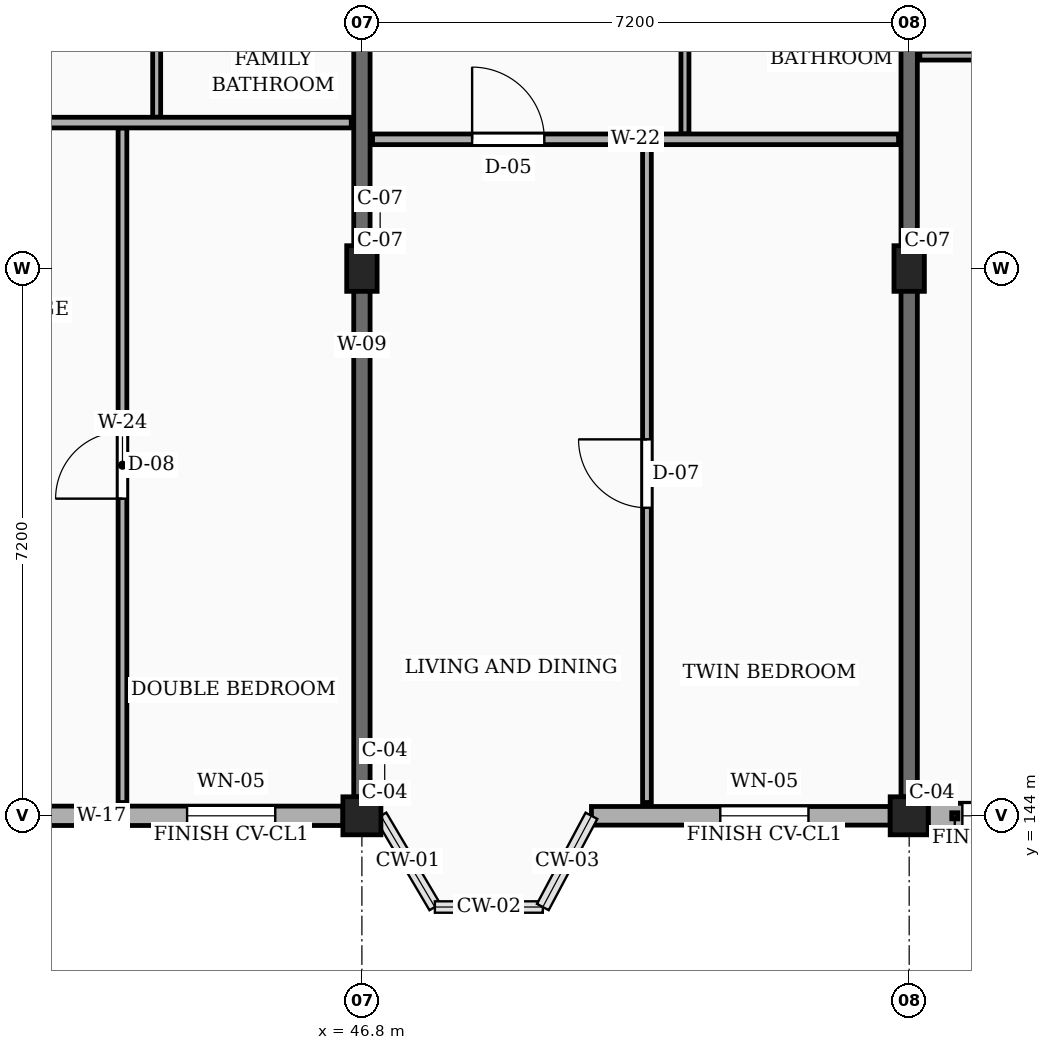
"""IFC4 building model, lengths in metres.
Left out: names, types, materials, properties, quantities, classifications, styles, units other than length and angle.
Written with IfcOpenShell. Run it as: python <this file> out.ifc"""

import sys

from ifc_helpers import new_model, si_unit, direction, frame, frame_2d, origin, origin_2d, place, context, subcontext, project, spatial, rectangle, extrude, element, fill, save


model = new_model("IFC4")
c1 = context("Model", 3, precision=1e-05, world=origin(), true_north=direction((0.0, 1.0)))
c2 = subcontext(c1, "Body", "Model", "MODEL_VIEW")
j1 = project(units=[si_unit("LENGTHUNIT", "METRE"), si_unit("PLANEANGLEUNIT", "RADIAN")], contexts=[c1])
p1 = place(None, origin())
s1 = spatial("IfcSite", under=j1, at=p1, CompositionType="ELEMENT")
p2 = place(p1, origin())
s2 = spatial("IfcBuilding", under=s1, at=p2, CompositionType="ELEMENT")
p3 = place(p2, frame((0.0, 0.0, 26.55)))
s3 = spatial("IfcBuildingStorey", under=s2, at=p3, CompositionType="ELEMENT", Elevation=26.55)
p4 = place(p3, frame((46.8, 144.0, 0.0), z_axis=(0.0, 0.0, 1.0), x_axis=(1.0, 0.0, 0.0)))
e1 = element("IfcColumn", 1, at=p4, inside=s3, PredefinedType="COLUMN", context=c2, shape_type="SweptSolid", body=[
    extrude(rectangle(XDim=0.5, YDim=0.5, at=origin_2d()), origin(), (0.0, 0.0, 1.0), 3.15),
])
p5 = place(p3, frame((46.8, 151.2, 0.0), z_axis=(0.0, 0.0, 1.0), x_axis=(1.0, 0.0, 0.0)))
e2 = element("IfcColumn", 2, at=p5, inside=s3, PredefinedType="COLUMN", context=c2, shape_type="SweptSolid", body=[
    extrude(rectangle(XDim=0.4, YDim=0.6, at=origin_2d()), origin(), (0.0, 0.0, 1.0), 3.15),
])
p6 = place(p3, frame((54.0, 144.0, 0.0), z_axis=(0.0, 0.0, 1.0), x_axis=(1.0, 0.0, 0.0)))
e3 = element("IfcColumn", 3, at=p6, inside=s3, PredefinedType="COLUMN", context=c2, shape_type="SweptSolid", body=[
    extrude(rectangle(XDim=0.5, YDim=0.5, at=origin_2d()), origin(), (0.0, 0.0, 1.0), 3.15),
])
p7 = place(p3, frame((54.0, 151.2, 0.0), z_axis=(0.0, 0.0, 1.0), x_axis=(1.0, 0.0, 0.0)))
e4 = element("IfcColumn", 4, at=p7, inside=s3, PredefinedType="COLUMN", context=c2, shape_type="SweptSolid", body=[
    extrude(rectangle(XDim=0.4, YDim=0.6, at=origin_2d()), origin(), (0.0, 0.0, 1.0), 3.15),
])
for number, where, z_axis, x_axis in (
    (5, (46.8, 144.25, 0.0), (0.0, 0.0, 1.0), (0.0, 1.0, 0.0)),
    (6, (54.0, 144.25, 0.0), (0.0, 0.0, 1.0), (0.0, 1.0, 0.0)),
):
    element("IfcWall", number, at=place(p3, frame(where, z_axis=z_axis, x_axis=x_axis)), inside=s3, PredefinedType="SOLIDWALL", context=c2, shape_type="SweptSolid", body=[
        extrude(rectangle(XDim=11.9, YDim=0.215, at=frame_2d((5.95, 0.0))), origin(), (0.0, 0.0, 1.0), 2.185),
    ])
p8 = place(p3, frame((39.85, 144.0, 0.0), z_axis=(0.0, 0.0, 1.0), x_axis=(1.0, 0.0, 0.0)))
e7 = element("IfcWall", 7, at=p8, inside=s3, PredefinedType="SOLIDWALL", context=c2, shape_type="SweptSolid", body=[
    extrude(rectangle(XDim=6.7, YDim=0.255, at=frame_2d((3.35, 0.0))), origin(), (0.0, 0.0, 1.0), 2.455),
])
p9 = place(p8, frame((0.45, 0.0, 0.78)))
e8 = element("IfcOpeningElement", 8, at=p9, cuts=e7, PredefinedType="OPENING", context=c2, shape_type="SweptSolid", body=[
    extrude(rectangle(XDim=1.0, YDim=1.15, at=frame_2d((0.5, 0.575))), frame((0.0, 0.137, 0.0), z_axis=(0.0, -1.0, 0.0), x_axis=(1.0, 0.0, 0.0)), (0.0, 0.0, 1.0), 0.275),
])
p10 = place(p8, frame((4.65, 0.0, 0.78)))
e9 = element("IfcOpeningElement", 9, at=p10, cuts=e7, PredefinedType="OPENING", context=c2, shape_type="SweptSolid", body=[
    extrude(rectangle(XDim=1.16, YDim=1.15, at=frame_2d((0.58, 0.575))), frame((0.0, 0.137, 0.0), z_axis=(0.0, -1.0, 0.0), x_axis=(1.0, 0.0, 0.0)), (0.0, 0.0, 1.0), 0.275),
])
p11 = place(p3, frame((49.82, 144.0, 0.0), z_axis=(0.0, 0.0, 1.0), x_axis=(1.0, 0.0, 0.0)))
e10 = element("IfcWall", 10, at=p11, inside=s3, PredefinedType="SOLIDWALL", context=c2, shape_type="SweptSolid", body=[
    extrude(rectangle(XDim=3.93, YDim=0.245, at=frame_2d((1.965, 0.0))), origin(), (0.0, 0.0, 1.0), 2.455),
])
p12 = place(p11, frame((1.695, 0.0, 0.78)))
e11 = element("IfcOpeningElement", 11, at=p12, cuts=e10, PredefinedType="OPENING", context=c2, shape_type="SweptSolid", body=[
    extrude(rectangle(XDim=1.16, YDim=1.15, at=frame_2d((0.58, 0.575))), frame((0.0, 0.133, 0.0), z_axis=(0.0, -1.0, 0.0), x_axis=(1.0, 0.0, 0.0)), (0.0, 0.0, 1.0), 0.265),
])
p13 = place(p3, frame((54.25, 144.0, 0.0), z_axis=(0.0, 0.0, 1.0), x_axis=(1.0, 0.0, 0.0)))
e12 = element("IfcWall", 12, at=p13, inside=s3, PredefinedType="SOLIDWALL", context=c2, shape_type="SweptSolid", body=[
    extrude(rectangle(XDim=6.7, YDim=0.33, at=frame_2d((3.35, 0.0))), origin(), (0.0, 0.0, 1.0), 2.455),
])
p14 = place(p13, frame((0.45, 0.0, 0.78)))
e13 = element("IfcOpeningElement", 13, at=p14, cuts=e12, PredefinedType="OPENING", context=c2, shape_type="SweptSolid", body=[
    extrude(rectangle(XDim=1.24, YDim=1.15, at=frame_2d((0.62, 0.575))), frame((0.0, 0.175, 0.0), z_axis=(0.0, -1.0, 0.0), x_axis=(1.0, 0.0, 0.0)), (0.0, 0.0, 1.0), 0.35),
])
p15 = place(p13, frame((4.65, 0.0, 0.78)))
e14 = element("IfcOpeningElement", 14, at=p15, cuts=e12, PredefinedType="OPENING", context=c2, shape_type="SweptSolid", body=[
    extrude(rectangle(XDim=1.4, YDim=1.15, at=frame_2d((0.7, 0.575))), frame((0.0, 0.175, 0.0), z_axis=(0.0, -1.0, 0.0), x_axis=(1.0, 0.0, 0.0)), (0.0, 0.0, 1.0), 0.35),
])
p16 = place(p3, frame((43.65, 144.175, 0.0), z_axis=(0.0, 0.0, 1.0), x_axis=(0.0, 1.0, 0.0)))
e15 = element("IfcWall", 15, at=p16, inside=s3, PredefinedType="PARTITIONING", context=c2, shape_type="SweptSolid", body=[
    extrude(rectangle(XDim=8.875, YDim=0.115, at=frame_2d((4.438, 0.0))), origin(), (0.0, 0.0, 1.0), 2.32),
])
p17 = place(p16, frame((3.998, 0.0, 0.0)))
e16 = element("IfcOpeningElement", 16, at=p17, cuts=e15, PredefinedType="OPENING", context=c2, shape_type="SweptSolid", body=[
    extrude(rectangle(XDim=0.88, YDim=2.08, at=frame_2d((0.44, 1.04))), frame((0.0, 0.067, 0.0), z_axis=(0.0, -1.0, 0.0), x_axis=(1.0, 0.0, 0.0)), (0.0, 0.0, 1.0), 0.135),
])
p18 = place(p3, frame((44.1, 153.19, 0.0), z_axis=(0.0, 0.0, 1.0), x_axis=(0.0, 1.0, 0.0)))
e17 = element("IfcWall", 17, at=p18, inside=s3, PredefinedType="PARTITIONING", context=c2, shape_type="SweptSolid", body=[
    extrude(rectangle(XDim=3.02, YDim=0.105, at=frame_2d((1.51, 0.0))), origin(), (0.0, 0.0, 1.0), 2.32),
])
p19 = place(p18, frame((1.075, 0.0, 0.0)))
e18 = element("IfcOpeningElement", 18, at=p19, cuts=e17, PredefinedType="OPENING", context=c2, shape_type="SweptSolid", body=[
    extrude(rectangle(XDim=0.87, YDim=2.05, at=frame_2d((0.435, 1.025))), frame((0.0, 0.062, 0.0), z_axis=(0.0, -1.0, 0.0), x_axis=(1.0, 0.0, 0.0)), (0.0, 0.0, 1.0), 0.125),
])
p20 = place(p3, frame((39.74, 153.12, 0.0), z_axis=(0.0, 0.0, 1.0), x_axis=(1.0, 0.0, 0.0)))
e19 = element("IfcWall", 19, at=p20, inside=s3, PredefinedType="PARTITIONING", context=c2, shape_type="SweptSolid", body=[
    extrude(rectangle(XDim=6.92, YDim=0.14, at=frame_2d((3.46, 0.0))), origin(), (0.0, 0.0, 1.0), 2.32),
])
p21 = place(p20, frame((1.31, 0.0, 0.0)))
e20 = element("IfcOpeningElement", 20, at=p21, cuts=e19, PredefinedType="OPENING", context=c2, shape_type="SweptSolid", body=[
    extrude(rectangle(XDim=0.92, YDim=2.1, at=frame_2d((0.46, 1.05))), frame((0.0, 0.08, 0.0), z_axis=(0.0, -1.0, 0.0), x_axis=(1.0, 0.0, 0.0)), (0.0, 0.0, 1.0), 0.16),
])
p22 = place(p3, frame((50.55, 144.175, 0.0), z_axis=(0.0, 0.0, 1.0), x_axis=(0.0, 1.0, 0.0)))
e21 = element("IfcWall", 21, at=p22, inside=s3, PredefinedType="PARTITIONING", context=c2, shape_type="SweptSolid", body=[
    extrude(rectangle(XDim=8.655, YDim=0.115, at=frame_2d((4.328, 0.0))), origin(), (0.0, 0.0, 1.0), 2.32),
])
p23 = place(p22, frame((3.877, 0.0, 0.0)))
e22 = element("IfcOpeningElement", 22, at=p23, cuts=e21, PredefinedType="OPENING", context=c2, shape_type="SweptSolid", body=[
    extrude(rectangle(XDim=0.9, YDim=2.1, at=frame_2d((0.45, 1.05))), frame((0.0, 0.067, 0.0), z_axis=(0.0, -1.0, 0.0), x_axis=(1.0, 0.0, 0.0)), (0.0, 0.0, 1.0), 0.135),
])
p24 = place(p3, frame((51.05, 152.97, 0.0), z_axis=(0.0, 0.0, 1.0), x_axis=(0.0, 1.0, 0.0)))
e23 = element("IfcWall", 23, at=p24, inside=s3, PredefinedType="PARTITIONING", context=c2, shape_type="SweptSolid", body=[
    extrude(rectangle(XDim=3.24, YDim=0.105, at=frame_2d((1.62, 0.0))), origin(), (0.0, 0.0, 1.0), 2.32),
])
p25 = place(p24, frame((1.17, 0.0, 0.0)))
e24 = element("IfcOpeningElement", 24, at=p25, cuts=e23, PredefinedType="OPENING", context=c2, shape_type="SweptSolid", body=[
    extrude(rectangle(XDim=0.9, YDim=2.05, at=frame_2d((0.45, 1.025))), frame((0.0, 0.062, 0.0), z_axis=(0.0, -1.0, 0.0), x_axis=(1.0, 0.0, 0.0)), (0.0, 0.0, 1.0), 0.125),
])
p26 = place(p3, frame((46.94, 152.9, 0.0), z_axis=(0.0, 0.0, 1.0), x_axis=(1.0, 0.0, 0.0)))
e25 = element("IfcWall", 25, at=p26, inside=s3, PredefinedType="PARTITIONING", context=c2, shape_type="SweptSolid", body=[
    extrude(rectangle(XDim=6.92, YDim=0.14, at=frame_2d((3.46, 0.0))), origin(), (0.0, 0.0, 1.0), 2.32),
])
p27 = place(p26, frame((1.31, 0.0, 0.0)))
e26 = element("IfcOpeningElement", 26, at=p27, cuts=e25, PredefinedType="OPENING", context=c2, shape_type="SweptSolid", body=[
    extrude(rectangle(XDim=0.95, YDim=2.1, at=frame_2d((0.475, 1.05))), frame((0.0, 0.08, 0.0), z_axis=(0.0, -1.0, 0.0), x_axis=(1.0, 0.0, 0.0)), (0.0, 0.0, 1.0), 0.16),
])
p28 = place(p3, frame((54.14, 154.0, 0.0), z_axis=(0.0, 0.0, 1.0), x_axis=(1.0, 0.0, 0.0)))
e27 = element("IfcWall", 27, at=p28, inside=s3, PredefinedType="PARTITIONING", context=c2, shape_type="SweptSolid", body=[
    extrude(rectangle(XDim=2.41, YDim=0.115, at=frame_2d((1.205, 0.0))), origin(), (0.0, 0.0, 1.0), 2.32),
])
p29 = place(p10, origin())
e28 = element("IfcWindow", 28, at=p29, inside=s3, PartitioningType="SINGLE_PANEL", PredefinedType="WINDOW", context=c2, shape_type="SweptSolid", body=[
    extrude(rectangle(XDim=1.16, YDim=1.15, at=frame_2d((0.58, 0.575))), frame((0.0, 0.03, 0.0), z_axis=(0.0, -1.0, 0.0), x_axis=(1.0, 0.0, 0.0)), (0.0, 0.0, 1.0), 0.06),
])
fill(e9, e28)
p30 = place(p12, origin())
e29 = element("IfcWindow", 29, at=p30, inside=s3, PartitioningType="SINGLE_PANEL", PredefinedType="WINDOW", context=c2, shape_type="SweptSolid", body=[
    extrude(rectangle(XDim=1.16, YDim=1.15, at=frame_2d((0.58, 0.575))), frame((0.0, 0.03, 0.0), z_axis=(0.0, -1.0, 0.0), x_axis=(1.0, 0.0, 0.0)), (0.0, 0.0, 1.0), 0.06),
])
fill(e11, e29)
p31 = place(p14, origin())
e30 = element("IfcWindow", 30, at=p31, inside=s3, PartitioningType="SINGLE_PANEL", PredefinedType="WINDOW", context=c2, shape_type="SweptSolid", body=[
    extrude(rectangle(XDim=1.24, YDim=1.15, at=frame_2d((0.62, 0.575))), frame((0.0, 0.03, 0.0), z_axis=(0.0, -1.0, 0.0), x_axis=(1.0, 0.0, 0.0)), (0.0, 0.0, 1.0), 0.06),
])
fill(e13, e30)
p32 = place(p17, origin())
e31 = element("IfcDoor", 31, at=p32, inside=s3, OperationType="SINGLE_SWING_LEFT", PredefinedType="DOOR", context=c2, shape_type="SweptSolid", body=[
    extrude(rectangle(XDim=0.88, YDim=2.08, at=frame_2d((0.44, 1.04))), frame((0.0, 0.025, 0.0), z_axis=(0.0, -1.0, 0.0), x_axis=(1.0, 0.0, 0.0)), (0.0, 0.0, 1.0), 0.05),
])
fill(e16, e31)
p33 = place(p23, origin())
e32 = element("IfcDoor", 32, at=p33, inside=s3, OperationType="SINGLE_SWING_RIGHT", PredefinedType="DOOR", context=c2, shape_type="SweptSolid", body=[
    extrude(rectangle(XDim=0.9, YDim=2.1, at=frame_2d((0.45, 1.05))), frame((0.0, 0.025, 0.0), z_axis=(0.0, -1.0, 0.0), x_axis=(1.0, 0.0, 0.0)), (0.0, 0.0, 1.0), 0.05),
])
fill(e22, e32)
p34 = place(p27, origin())
e33 = element("IfcDoor", 33, at=p34, inside=s3, OperationType="SINGLE_SWING_LEFT", PredefinedType="DOOR", context=c2, shape_type="SweptSolid", body=[
    extrude(rectangle(XDim=0.95, YDim=2.1, at=frame_2d((0.475, 1.05))), frame((0.0, 0.025, 0.0), z_axis=(0.0, -1.0, 0.0), x_axis=(1.0, 0.0, 0.0)), (0.0, 0.0, 1.0), 0.05),
])
fill(e26, e33)
save(model, sys.argv[1])
